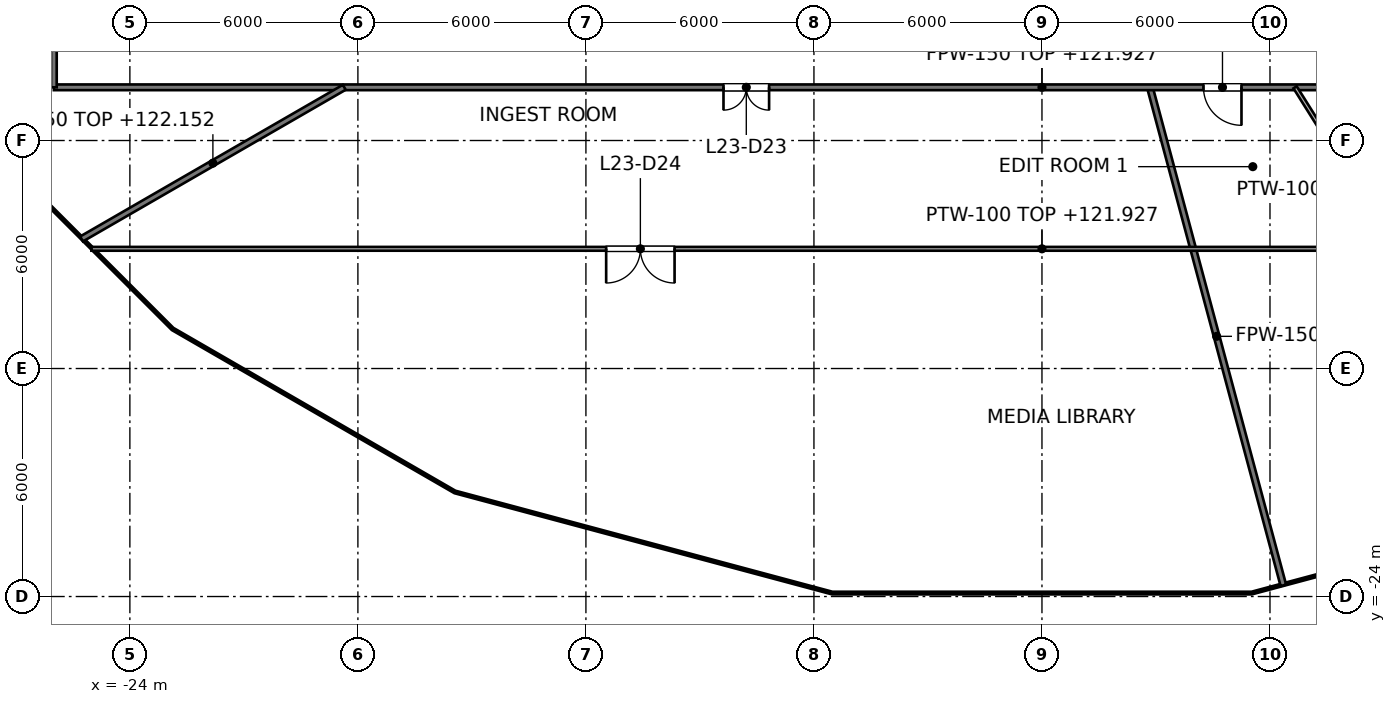
"""IFC4 building model, lengths in metres.
Left out: names, types, materials, properties, quantities, classifications, styles, units other than length and angle.
Written with IfcOpenShell. Run it as: python <this file> out.ifc"""

import sys

from ifc_helpers import new_model, si_unit, direction, frame, frame_2d, origin, place, context, subcontext, project, spatial, rectangle, extrude, element, fill, save


model = new_model("IFC4")
c1 = context("Model", 3, precision=1e-05, world=origin(), true_north=direction((0.0, 1.0)))
c2 = subcontext(c1, "Body", "Model", "MODEL_VIEW")
j1 = project(units=[si_unit("LENGTHUNIT", "METRE"), si_unit("PLANEANGLEUNIT", "RADIAN")], contexts=[c1])
p1 = place(None, origin())
s1 = spatial("IfcSite", under=j1, at=p1, CompositionType="ELEMENT")
p2 = place(p1, origin())
s2 = spatial("IfcBuilding", under=s1, at=p2, CompositionType="ELEMENT")
p3 = place(p2, frame((0.0, 0.0, 118.8)))
s3 = spatial("IfcBuildingStorey", under=s2, at=p3, CompositionType="ELEMENT", Elevation=118.8)
p4 = place(p3, frame((2.84, -10.6, 0.0), z_axis=(0.0, 0.0, 1.0), x_axis=(0.258835018107, -0.965921546194, 0.0)))
e1 = element("IfcWall", 1, at=p4, inside=s3, PredefinedType="PARTITIONING", context=c2, shape_type="SweptSolid", body=[
    extrude(rectangle(XDim=13.568, YDim=0.15, at=frame_2d((6.784, 0.0))), origin(), (0.0, 0.0, 1.0), 3.502),
])
p5 = place(p3, frame((-26.0, -10.6, 0.0), z_axis=(0.0, 0.0, 1.0), x_axis=(1.0, 0.0, 0.0)))
e2 = element("IfcWall", 2, at=p5, inside=s3, PredefinedType="PARTITIONING", context=c2, shape_type="SweptSolid", body=[
    extrude(rectangle(XDim=52.0, YDim=0.15, at=frame_2d((26.0, 0.0))), origin(), (0.0, 0.0, 1.0), 3.127),
])
p6 = place(p5, frame((17.62, 0.0, 0.0)))
e3 = element("IfcOpeningElement", 3, at=p6, cuts=e2, PredefinedType="OPENING", context=c2, shape_type="SweptSolid", body=[
    extrude(rectangle(XDim=1.2, YDim=2.1, at=frame_2d((0.6, 1.05))), frame((0.0, 0.075, 0.0), z_axis=(0.0, -1.0, 0.0), x_axis=(1.0, 0.0, 0.0)), (0.0, 0.0, 1.0), 0.15),
])
p7 = place(p5, frame((30.25, 0.0, 0.0)))
e4 = element("IfcOpeningElement", 4, at=p7, cuts=e2, PredefinedType="OPENING", context=c2, shape_type="SweptSolid", body=[
    extrude(rectangle(XDim=1.0, YDim=2.1, at=frame_2d((0.5, 1.05))), frame((0.0, 0.075, 0.0), z_axis=(0.0, -1.0, 0.0), x_axis=(1.0, 0.0, 0.0)), (0.0, 0.0, 1.0), 0.15),
])
p8 = place(p5, frame((34.989, 0.0, 0.0)))
e5 = element("IfcOpeningElement", 5, at=p8, cuts=e2, PredefinedType="OPENING", context=c2, shape_type="SweptSolid", body=[
    extrude(rectangle(XDim=1.0, YDim=2.1, at=frame_2d((0.5, 1.05))), frame((0.0, 0.075, 0.0), z_axis=(0.0, -1.0, 0.0), x_axis=(1.0, 0.0, 0.0)), (0.0, 0.0, 1.0), 0.15),
])
p9 = place(p5, frame((44.658, 0.0, 0.0)))
e6 = element("IfcOpeningElement", 6, at=p9, cuts=e2, PredefinedType="OPENING", context=c2, shape_type="SweptSolid", body=[
    extrude(rectangle(XDim=1.0, YDim=2.1, at=frame_2d((0.5, 1.05))), frame((0.0, 0.075, 0.0), z_axis=(0.0, -1.0, 0.0), x_axis=(1.0, 0.0, 0.0)), (0.0, 0.0, 1.0), 0.15),
])
p10 = place(p3, frame((-25.272, -14.591, 0.0), z_axis=(0.0, 0.0, 1.0), x_axis=(0.866041960816, 0.499971321283, 0.0)))
e7 = element("IfcWall", 7, at=p10, inside=s3, PredefinedType="PARTITIONING", context=c2, shape_type="SweptSolid", body=[
    extrude(rectangle(XDim=7.982, YDim=0.15, at=frame_2d((3.991, 0.0))), origin(), (0.0, 0.0, 1.0), 3.352),
])
p11 = place(p3, frame((-26.0, -10.6, 0.0), z_axis=(0.0, 0.0, 1.0), x_axis=(0.0, 1.0, 0.0)))
e8 = element("IfcWall", 8, at=p11, inside=s3, PredefinedType="PARTITIONING", context=c2, shape_type="SweptSolid", body=[
    extrude(rectangle(XDim=2.8, YDim=0.15, at=frame_2d((1.4, 0.0))), origin(), (0.0, 0.0, 1.0), 3.276),
])
p12 = place(p3, frame((6.66, -10.6, 0.0), z_axis=(0.0, 0.0, 1.0), x_axis=(0.532130705972, -0.846662218221, 0.0)))
e9 = element("IfcWall", 9, at=p12, inside=s3, PredefinedType="PARTITIONING", context=c2, shape_type="SweptSolid", body=[
    extrude(rectangle(XDim=5.02, YDim=0.1, at=frame_2d((2.51, 0.0))), origin(), (0.0, 0.0, 1.0), 4.05),
])
p13 = place(p3, frame((-25.013, -14.85, 0.0), z_axis=(0.0, 0.0, 1.0), x_axis=(1.0, 0.0, 0.0)))
e10 = element("IfcWall", 10, at=p13, inside=s3, PredefinedType="PARTITIONING", context=c2, shape_type="SweptSolid", body=[
    extrude(rectangle(XDim=50.026, YDim=0.1, at=frame_2d((25.013, 0.0))), origin(), (0.0, 0.0, 1.0), 3.127),
])
p14 = place(p13, frame((13.546, 0.0, 0.0)))
e11 = element("IfcOpeningElement", 11, at=p14, cuts=e10, PredefinedType="OPENING", context=c2, shape_type="SweptSolid", body=[
    extrude(rectangle(XDim=1.8, YDim=2.1, at=frame_2d((0.9, 1.05))), frame((0.0, 0.05, 0.0), z_axis=(0.0, -1.0, 0.0), x_axis=(1.0, 0.0, 0.0)), (0.0, 0.0, 1.0), 0.1),
])
p15 = place(p13, frame((43.98, 0.0, 0.0)))
e12 = element("IfcOpeningElement", 12, at=p15, cuts=e10, PredefinedType="OPENING", context=c2, shape_type="SweptSolid", body=[
    extrude(rectangle(XDim=0.9, YDim=2.1, at=frame_2d((0.45, 1.05))), frame((0.0, 0.05, 0.0), z_axis=(0.0, -1.0, 0.0), x_axis=(1.0, 0.0, 0.0)), (0.0, 0.0, 1.0), 0.1),
])
p16 = place(p6, origin())
e13 = element("IfcDoor", 13, at=p16, inside=s3, OperationType="DOUBLE_DOOR_SINGLE_SWING", PredefinedType="DOOR", context=c2, shape_type="SweptSolid", body=[
    extrude(rectangle(XDim=1.2, YDim=2.1, at=frame_2d((0.6, 1.05))), frame((0.0, 0.025, 0.0), z_axis=(0.0, -1.0, 0.0), x_axis=(1.0, 0.0, 0.0)), (0.0, 0.0, 1.0), 0.05),
])
fill(e3, e13)
p17 = place(p14, origin())
e14 = element("IfcDoor", 14, at=p17, inside=s3, OperationType="DOUBLE_DOOR_SINGLE_SWING", PredefinedType="DOOR", context=c2, shape_type="SweptSolid", body=[
    extrude(rectangle(XDim=1.8, YDim=2.1, at=frame_2d((0.9, 1.05))), frame((0.0, 0.025, 0.0), z_axis=(0.0, -1.0, 0.0), x_axis=(1.0, 0.0, 0.0)), (0.0, 0.0, 1.0), 0.05),
])
fill(e11, e14)
p18 = place(p7, origin())
e15 = element("IfcDoor", 15, at=p18, inside=s3, OperationType="SINGLE_SWING_RIGHT", PredefinedType="DOOR", context=c2, shape_type="SweptSolid", body=[
    extrude(rectangle(XDim=1.0, YDim=2.1, at=frame_2d((0.5, 1.05))), frame((0.0, 0.025, 0.0), z_axis=(0.0, -1.0, 0.0), x_axis=(1.0, 0.0, 0.0)), (0.0, 0.0, 1.0), 0.05),
])
fill(e4, e15)
save(model, sys.argv[1])
